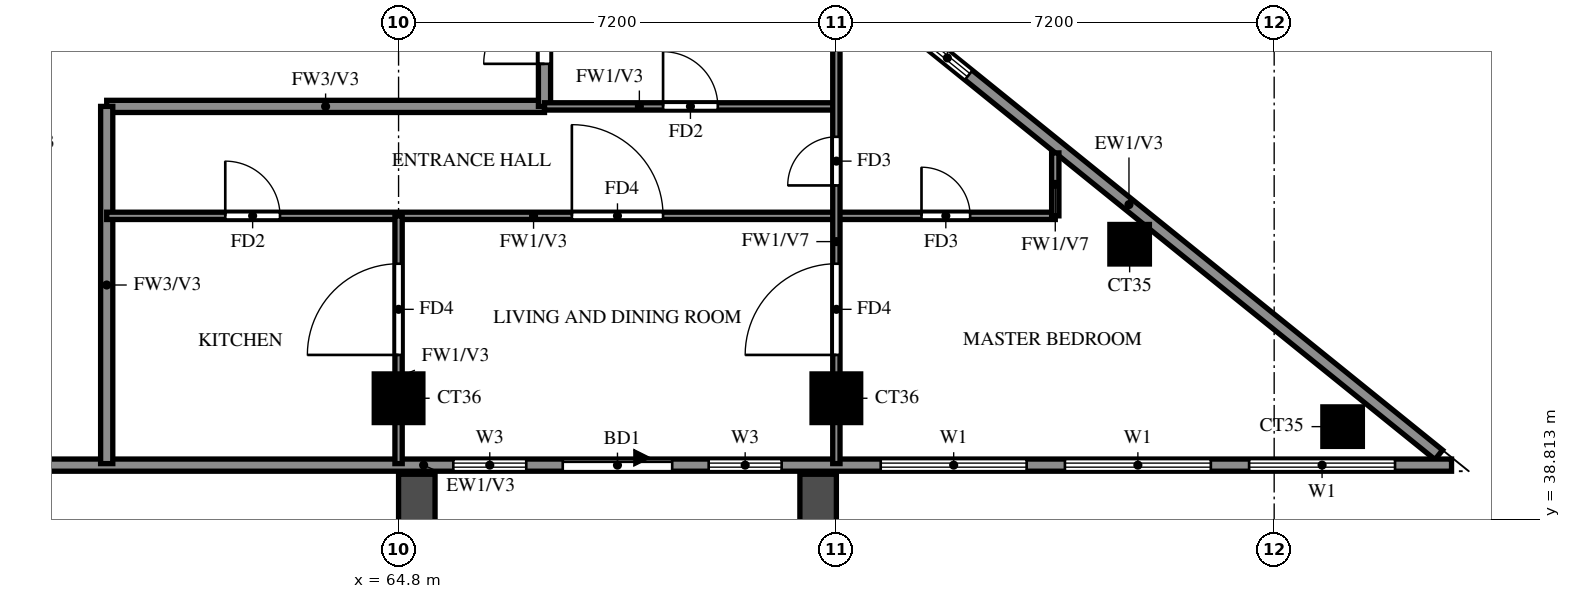
"""IFC4 building model, lengths in metres.
Left out: names, types, materials, properties, quantities, classifications, styles, units other than length and angle.
Written with IfcOpenShell. Run it as: python <this file> out.ifc"""

import sys

from ifc_helpers import new_model, si_unit, direction, frame, frame_2d, origin, origin_2d, place, context, subcontext, project, spatial, rectangle, extrude, source, transform, mapped, element, fill, save


model = new_model("IFC4")
c1 = context("Model", 3, precision=1e-05, world=origin(), true_north=direction((0.0, 1.0)))
c2 = subcontext(c1, "Body", "Model", "MODEL_VIEW")
j1 = project(units=[si_unit("LENGTHUNIT", "METRE"), si_unit("PLANEANGLEUNIT", "RADIAN")], contexts=[c1])
p1 = place(None, origin())
s1 = spatial("IfcSite", under=j1, at=p1, CompositionType="ELEMENT")
p2 = place(p1, origin())
s2 = spatial("IfcBuilding", under=s1, at=p2, CompositionType="ELEMENT")
p3 = place(p2, frame((0.0, 0.0, 232.5)))
s3 = spatial("IfcBuildingStorey", under=s2, at=p3, CompositionType="ELEMENT", Elevation=232.5)
m1 = source(origin(), c2, "Body", "SweptSolid", [
    extrude(rectangle(XDim=0.65, YDim=0.65, at=origin_2d()), origin(), (0.0, 0.0, 1.0), 3.22),
])
p4 = place(p3, frame((80.326, 40.333, 0.0), z_axis=(0.0, 0.0, 1.0), x_axis=(1.0, 0.0, 0.0)))
e1 = element("IfcColumn", 1, at=p4, inside=s3, PredefinedType="COLUMN", context=c2, shape_type="MappedRepresentation", body=[
    mapped(m1, transform((0.0, 0.0, 0.0))),
])
m2 = source(origin(), c2, "Body", "SweptSolid", [
    extrude(rectangle(XDim=0.8, YDim=0.8, at=origin_2d()), origin(), (0.0, 0.0, 1.0), 3.22),
])
for number, where, z_axis, x_axis in (
    (2, (64.8, 40.8, 0.0), (0.0, 0.0, 1.0), (1.0, 0.0, 0.0)),
    (3, (72.0, 40.8, 0.0), (0.0, 0.0, 1.0), (1.0, 0.0, 0.0)),
):
    element("IfcColumn", number, at=place(p3, frame(where, z_axis=z_axis, x_axis=x_axis)), inside=s3, PredefinedType="COLUMN", context=c2, shape_type="MappedRepresentation", body=[
        mapped(m2, transform((0.0, 0.0, 0.0))),
    ])
p5 = place(p3, frame((76.823, 43.333, 0.0), z_axis=(0.0, 0.0, 1.0), x_axis=(1.0, 0.0, 0.0)))
e4 = element("IfcColumn", 4, at=p5, inside=s3, PredefinedType="COLUMN", context=c2, shape_type="MappedRepresentation", body=[
    mapped(m1, transform((0.0, 0.0, 0.0))),
])
p6 = place(p3, frame((81.907, 39.87, 0.0), z_axis=(0.0, 0.0, 1.0), x_axis=(-0.777936274417, 0.62834318087, 0.0)))
e5 = element("IfcWall", 5, at=p6, inside=s3, PredefinedType="SOLIDWALL", context=c2, shape_type="SweptSolid", body=[
    extrude(rectangle(XDim=13.099, YDim=0.2, at=frame_2d((6.549, 0.0))), origin(), (0.0, 0.0, 1.0), 3.22),
])
p7 = place(p6, frame((9.938, 0.0, 1.5)))
e6 = element("IfcOpeningElement", 6, at=p7, cuts=e5, PredefinedType="OPENING", context=c2, shape_type="SweptSolid", body=[
    extrude(rectangle(XDim=0.9, YDim=0.9, at=frame_2d((0.45, 0.45))), frame((0.0, 0.11, 0.0), z_axis=(0.0, -1.0, 0.0), x_axis=(1.0, 0.0, 0.0)), (0.0, 0.0, 1.0), 0.22),
])
p8 = place(p3, frame((58.8, 39.7, 0.0), z_axis=(0.0, 0.0, 1.0), x_axis=(1.0, 0.0, 0.0)))
e7 = element("IfcWall", 7, at=p8, inside=s3, PredefinedType="SOLIDWALL", context=c2, shape_type="SweptSolid", body=[
    extrude(rectangle(XDim=23.317, YDim=0.2, at=frame_2d((11.658, 0.0))), origin(), (0.0, 0.0, 1.0), 3.22),
])
p9 = place(p8, frame((8.7, 0.0, 0.0)))
e8 = element("IfcOpeningElement", 8, at=p9, cuts=e7, PredefinedType="OPENING", context=c2, shape_type="SweptSolid", body=[
    extrude(rectangle(XDim=1.8, YDim=2.4, at=frame_2d((0.9, 1.2))), frame((0.0, 0.11, 0.0), z_axis=(0.0, -1.0, 0.0), x_axis=(1.0, 0.0, 0.0)), (0.0, 0.0, 1.0), 0.22),
])
p10 = place(p8, frame((6.9, 0.0, 0.6)))
e9 = element("IfcOpeningElement", 9, at=p10, cuts=e7, PredefinedType="OPENING", context=c2, shape_type="SweptSolid", body=[
    extrude(rectangle(XDim=1.2, YDim=2.4, at=frame_2d((0.6, 1.2))), frame((0.0, 0.11, 0.0), z_axis=(0.0, -1.0, 0.0), x_axis=(1.0, 0.0, 0.0)), (0.0, 0.0, 1.0), 0.22),
])
p11 = place(p8, frame((11.1, 0.0, 0.6)))
e10 = element("IfcOpeningElement", 10, at=p11, cuts=e7, PredefinedType="OPENING", context=c2, shape_type="SweptSolid", body=[
    extrude(rectangle(XDim=1.2, YDim=2.4, at=frame_2d((0.6, 1.2))), frame((0.0, 0.11, 0.0), z_axis=(0.0, -1.0, 0.0), x_axis=(1.0, 0.0, 0.0)), (0.0, 0.0, 1.0), 0.22),
])
p12 = place(p8, frame((13.929, 0.0, 0.6)))
e11 = element("IfcOpeningElement", 11, at=p12, cuts=e7, PredefinedType="OPENING", context=c2, shape_type="SweptSolid", body=[
    extrude(rectangle(XDim=2.4, YDim=2.4, at=frame_2d((1.2, 1.2))), frame((0.0, 0.11, 0.0), z_axis=(0.0, -1.0, 0.0), x_axis=(1.0, 0.0, 0.0)), (0.0, 0.0, 1.0), 0.22),
])
p13 = place(p8, frame((16.958, 0.0, 0.6)))
e12 = element("IfcOpeningElement", 12, at=p13, cuts=e7, PredefinedType="OPENING", context=c2, shape_type="SweptSolid", body=[
    extrude(rectangle(XDim=2.4, YDim=2.4, at=frame_2d((1.2, 1.2))), frame((0.0, 0.11, 0.0), z_axis=(0.0, -1.0, 0.0), x_axis=(1.0, 0.0, 0.0)), (0.0, 0.0, 1.0), 0.22),
])
p14 = place(p8, frame((19.988, 0.0, 0.6)))
e13 = element("IfcOpeningElement", 13, at=p14, cuts=e7, PredefinedType="OPENING", context=c2, shape_type="SweptSolid", body=[
    extrude(rectangle(XDim=2.4, YDim=2.4, at=frame_2d((1.2, 1.2))), frame((0.0, 0.11, 0.0), z_axis=(0.0, -1.0, 0.0), x_axis=(1.0, 0.0, 0.0)), (0.0, 0.0, 1.0), 0.22),
])
for number, where, z_axis, x_axis in (
    (14, (65.1, 39.55, 0.0), (0.0, 0.0, 1.0), (0.0, -1.0, 0.0)),
    (15, (71.7, 39.55, 0.0), (0.0, 0.0, 1.0), (0.0, -1.0, 0.0)),
):
    element("IfcWall", number, at=place(p3, frame(where, z_axis=z_axis, x_axis=x_axis)), inside=s3, PredefinedType="SOLIDWALL", context=c2, shape_type="SweptSolid", body=[
        extrude(rectangle(XDim=2.65, YDim=0.6, at=frame_2d((1.325, 0.0))), origin(), (0.0, 0.0, 1.0), 2.85),
    ])
p15 = place(p3, frame((60.0, 45.6, 0.0), z_axis=(0.0, 0.0, 1.0), x_axis=(1.0, 0.0, 0.0)))
e16 = element("IfcWall", 16, at=p15, inside=s3, PredefinedType="SOLIDWALL", context=c2, shape_type="SweptSolid", body=[
    extrude(rectangle(XDim=7.2, YDim=0.2, at=frame_2d((3.6, 0.0))), origin(), (0.0, 0.0, 1.0), 3.22),
])
p16 = place(p3, frame((60.0, 39.725, 0.0), z_axis=(0.0, 0.0, 1.0), x_axis=(0.0, 1.0, 0.0)))
e17 = element("IfcWall", 17, at=p16, inside=s3, PredefinedType="SOLIDWALL", context=c2, shape_type="SweptSolid", body=[
    extrude(rectangle(XDim=5.875, YDim=0.2, at=frame_2d((2.938, 0.0))), origin(), (0.0, 0.0, 1.0), 3.22),
])
p17 = place(p3, frame((67.2, 45.6, 0.0), z_axis=(0.0, 0.0, 1.0), x_axis=(0.0, 1.0, 0.0)))
e18 = element("IfcWall", 18, at=p17, inside=s3, PredefinedType="SOLIDWALL", context=c2, shape_type="SweptSolid", body=[
    extrude(rectangle(XDim=16.8, YDim=0.2, at=frame_2d((8.4, 0.0))), origin(), (0.0, 0.0, 1.0), 3.22),
])
p18 = place(p17, frame((6.7, 0.0, 0.0)))
e19 = element("IfcOpeningElement", 19, at=p18, cuts=e18, PredefinedType="OPENING", context=c2, shape_type="SweptSolid", body=[
    extrude(rectangle(XDim=1.0, YDim=2.1, at=frame_2d((0.5, 1.05))), frame((0.0, 0.11, 0.0), z_axis=(0.0, -1.0, 0.0), x_axis=(1.0, 0.0, 0.0)), (0.0, 0.0, 1.0), 0.22),
])
p19 = place(p17, frame((15.1, 0.0, 0.0)))
e20 = element("IfcOpeningElement", 20, at=p19, cuts=e18, PredefinedType="OPENING", context=c2, shape_type="SweptSolid", body=[
    extrude(rectangle(XDim=1.0, YDim=2.1, at=frame_2d((0.5, 1.05))), frame((0.0, 0.11, 0.0), z_axis=(0.0, -1.0, 0.0), x_axis=(1.0, 0.0, 0.0)), (0.0, 0.0, 1.0), 0.22),
])
p20 = place(p17, frame((0.7, 0.0, 0.0)))
e21 = element("IfcOpeningElement", 21, at=p20, cuts=e18, PredefinedType="OPENING", context=c2, shape_type="SweptSolid", body=[
    extrude(rectangle(XDim=1.0, YDim=2.1, at=frame_2d((0.5, 1.05))), frame((0.0, 0.11, 0.0), z_axis=(0.0, -1.0, 0.0), x_axis=(1.0, 0.0, 0.0)), (0.0, 0.0, 1.0), 0.22),
])
p21 = place(p3, frame((60.0, 43.8, 0.0), z_axis=(0.0, 0.0, 1.0), x_axis=(1.0, 0.0, 0.0)))
e22 = element("IfcWall", 22, at=p21, inside=s3, PredefinedType="PARTITIONING", context=c2, shape_type="SweptSolid", body=[
    extrude(rectangle(XDim=15.6, YDim=0.12, at=frame_2d((7.8, 0.0))), origin(), (0.0, 0.0, 1.0), 3.22),
])
p22 = place(p21, frame((7.65, 0.0, 0.0)))
e23 = element("IfcOpeningElement", 23, at=p22, cuts=e22, PredefinedType="OPENING", context=c2, shape_type="SweptSolid", body=[
    extrude(rectangle(XDim=1.5, YDim=2.1, at=frame_2d((0.75, 1.05))), frame((0.0, 0.07, 0.0), z_axis=(0.0, -1.0, 0.0), x_axis=(1.0, 0.0, 0.0)), (0.0, 0.0, 1.0), 0.14),
])
p23 = place(p21, frame((1.95, 0.0, 0.0)))
e24 = element("IfcOpeningElement", 24, at=p23, cuts=e22, PredefinedType="OPENING", context=c2, shape_type="SweptSolid", body=[
    extrude(rectangle(XDim=0.9, YDim=2.1, at=frame_2d((0.45, 1.05))), frame((0.0, 0.07, 0.0), z_axis=(0.0, -1.0, 0.0), x_axis=(1.0, 0.0, 0.0)), (0.0, 0.0, 1.0), 0.14),
])
p24 = place(p21, frame((13.4, 0.0, 0.0)))
e25 = element("IfcOpeningElement", 25, at=p24, cuts=e22, PredefinedType="OPENING", context=c2, shape_type="SweptSolid", body=[
    extrude(rectangle(XDim=0.8, YDim=2.1, at=frame_2d((0.4, 1.05))), frame((0.0, 0.07, 0.0), z_axis=(0.0, -1.0, 0.0), x_axis=(1.0, 0.0, 0.0)), (0.0, 0.0, 1.0), 0.14),
])
p25 = place(p3, frame((67.2, 45.6, 0.0), z_axis=(0.0, 0.0, 1.0), x_axis=(1.0, 0.0, 0.0)))
e26 = element("IfcWall", 26, at=p25, inside=s3, PredefinedType="PARTITIONING", context=c2, shape_type="SweptSolid", body=[
    extrude(rectangle(XDim=4.8, YDim=0.12, at=frame_2d((2.4, 0.0))), origin(), (0.0, 0.0, 1.0), 3.22),
])
p26 = place(p25, frame((1.95, 0.0, 0.0)))
e27 = element("IfcOpeningElement", 27, at=p26, cuts=e26, PredefinedType="OPENING", context=c2, shape_type="SweptSolid", body=[
    extrude(rectangle(XDim=0.9, YDim=2.1, at=frame_2d((0.45, 1.05))), frame((0.0, 0.07, 0.0), z_axis=(0.0, -1.0, 0.0), x_axis=(1.0, 0.0, 0.0)), (0.0, 0.0, 1.0), 0.14),
])
p27 = place(p3, frame((64.8, 39.725, 0.0), z_axis=(0.0, 0.0, 1.0), x_axis=(0.0, 1.0, 0.0)))
e28 = element("IfcWall", 28, at=p27, inside=s3, PredefinedType="PARTITIONING", context=c2, shape_type="SweptSolid", body=[
    extrude(rectangle(XDim=4.075, YDim=0.12, at=frame_2d((2.038, 0.0))), origin(), (0.0, 0.0, 1.0), 3.22),
])
p28 = place(p27, frame((1.788, 0.0, 0.0)))
e29 = element("IfcOpeningElement", 29, at=p28, cuts=e28, PredefinedType="OPENING", context=c2, shape_type="SweptSolid", body=[
    extrude(rectangle(XDim=1.5, YDim=2.1, at=frame_2d((0.75, 1.05))), frame((0.0, 0.07, 0.0), z_axis=(0.0, -1.0, 0.0), x_axis=(1.0, 0.0, 0.0)), (0.0, 0.0, 1.0), 0.14),
])
p29 = place(p3, frame((72.0, 39.725, 0.0), z_axis=(0.0, 0.0, 1.0), x_axis=(0.0, 1.0, 0.0)))
e30 = element("IfcWall", 30, at=p29, inside=s3, PredefinedType="PARTITIONING", context=c2, shape_type="SweptSolid", body=[
    extrude(rectangle(XDim=8.114, YDim=0.12, at=frame_2d((4.057, 0.0))), origin(), (0.0, 0.0, 1.0), 2.32),
])
p30 = place(p29, frame((1.788, 0.0, 0.0)))
e31 = element("IfcOpeningElement", 31, at=p30, cuts=e30, PredefinedType="OPENING", context=c2, shape_type="SweptSolid", body=[
    extrude(rectangle(XDim=1.5, YDim=2.1, at=frame_2d((0.75, 1.05))), frame((0.0, 0.07, 0.0), z_axis=(0.0, -1.0, 0.0), x_axis=(1.0, 0.0, 0.0)), (0.0, 0.0, 1.0), 0.14),
])
p31 = place(p29, frame((4.575, 0.0, 0.0)))
e32 = element("IfcOpeningElement", 32, at=p31, cuts=e30, PredefinedType="OPENING", context=c2, shape_type="SweptSolid", body=[
    extrude(rectangle(XDim=0.8, YDim=2.1, at=frame_2d((0.4, 1.05))), frame((0.0, 0.07, 0.0), z_axis=(0.0, -1.0, 0.0), x_axis=(1.0, 0.0, 0.0)), (0.0, 0.0, 1.0), 0.14),
])
p32 = place(p3, frame((75.6, 43.8, 0.0), z_axis=(0.0, 0.0, 1.0), x_axis=(0.0, 1.0, 0.0)))
e33 = element("IfcWall", 33, at=p32, inside=s3, PredefinedType="PARTITIONING", context=c2, shape_type="SweptSolid", body=[
    extrude(rectangle(XDim=1.035, YDim=0.12, at=frame_2d((0.518, 0.0))), origin(), (0.0, 0.0, 1.0), 2.32),
])
p33 = place(p7, origin())
e34 = element("IfcWindow", 34, at=p33, inside=s3, PartitioningType="SINGLE_PANEL", PredefinedType="WINDOW", context=c2, shape_type="SweptSolid", body=[
    extrude(rectangle(XDim=0.9, YDim=0.9, at=frame_2d((0.45, 0.45))), frame((0.0, 0.03, 0.0), z_axis=(0.0, -1.0, 0.0), x_axis=(1.0, 0.0, 0.0)), (0.0, 0.0, 1.0), 0.06),
])
fill(e6, e34)
p34 = place(p9, origin())
e35 = element("IfcDoor", 35, at=p34, inside=s3, OperationType="DOUBLE_DOOR_SLIDING", PredefinedType="DOOR", context=c2, shape_type="SweptSolid", body=[
    extrude(rectangle(XDim=1.8, YDim=2.4, at=frame_2d((0.9, 1.2))), frame((0.0, 0.025, 0.0), z_axis=(0.0, -1.0, 0.0), x_axis=(1.0, 0.0, 0.0)), (0.0, 0.0, 1.0), 0.05),
])
fill(e8, e35)
p35 = place(p10, origin())
e36 = element("IfcWindow", 36, at=p35, inside=s3, PartitioningType="SINGLE_PANEL", PredefinedType="WINDOW", context=c2, shape_type="SweptSolid", body=[
    extrude(rectangle(XDim=1.2, YDim=2.4, at=frame_2d((0.6, 1.2))), frame((0.0, 0.03, 0.0), z_axis=(0.0, -1.0, 0.0), x_axis=(1.0, 0.0, 0.0)), (0.0, 0.0, 1.0), 0.06),
])
fill(e9, e36)
p36 = place(p11, origin())
e37 = element("IfcWindow", 37, at=p36, inside=s3, PartitioningType="SINGLE_PANEL", PredefinedType="WINDOW", context=c2, shape_type="SweptSolid", body=[
    extrude(rectangle(XDim=1.2, YDim=2.4, at=frame_2d((0.6, 1.2))), frame((0.0, 0.03, 0.0), z_axis=(0.0, -1.0, 0.0), x_axis=(1.0, 0.0, 0.0)), (0.0, 0.0, 1.0), 0.06),
])
fill(e10, e37)
p37 = place(p12, origin())
e38 = element("IfcWindow", 38, at=p37, inside=s3, PartitioningType="DOUBLE_PANEL_VERTICAL", PredefinedType="WINDOW", context=c2, shape_type="SweptSolid", body=[
    extrude(rectangle(XDim=2.4, YDim=2.4, at=frame_2d((1.2, 1.2))), frame((0.0, 0.03, 0.0), z_axis=(0.0, -1.0, 0.0), x_axis=(1.0, 0.0, 0.0)), (0.0, 0.0, 1.0), 0.06),
])
fill(e11, e38)
p38 = place(p13, origin())
e39 = element("IfcWindow", 39, at=p38, inside=s3, PartitioningType="DOUBLE_PANEL_VERTICAL", PredefinedType="WINDOW", context=c2, shape_type="SweptSolid", body=[
    extrude(rectangle(XDim=2.4, YDim=2.4, at=frame_2d((1.2, 1.2))), frame((0.0, 0.03, 0.0), z_axis=(0.0, -1.0, 0.0), x_axis=(1.0, 0.0, 0.0)), (0.0, 0.0, 1.0), 0.06),
])
fill(e12, e39)
p39 = place(p14, origin())
e40 = element("IfcWindow", 40, at=p39, inside=s3, PartitioningType="DOUBLE_PANEL_VERTICAL", PredefinedType="WINDOW", context=c2, shape_type="SweptSolid", body=[
    extrude(rectangle(XDim=2.4, YDim=2.4, at=frame_2d((1.2, 1.2))), frame((0.0, 0.03, 0.0), z_axis=(0.0, -1.0, 0.0), x_axis=(1.0, 0.0, 0.0)), (0.0, 0.0, 1.0), 0.06),
])
fill(e13, e40)
p40 = place(p28, origin())
e41 = element("IfcDoor", 41, at=p40, inside=s3, OperationType="SINGLE_SWING_LEFT", PredefinedType="DOOR", context=c2, shape_type="SweptSolid", body=[
    extrude(rectangle(XDim=1.5, YDim=2.1, at=frame_2d((0.75, 1.05))), frame((0.0, 0.025, 0.0), z_axis=(0.0, -1.0, 0.0), x_axis=(1.0, 0.0, 0.0)), (0.0, 0.0, 1.0), 0.05),
])
fill(e29, e41)
p41 = place(p26, origin())
e42 = element("IfcDoor", 42, at=p41, inside=s3, OperationType="SINGLE_SWING_LEFT", PredefinedType="DOOR", context=c2, shape_type="SweptSolid", body=[
    extrude(rectangle(XDim=0.9, YDim=2.1, at=frame_2d((0.45, 1.05))), frame((0.0, 0.025, 0.0), z_axis=(0.0, -1.0, 0.0), x_axis=(1.0, 0.0, 0.0)), (0.0, 0.0, 1.0), 0.05),
])
fill(e27, e42)
p42 = place(p20, origin())
e43 = element("IfcDoor", 43, at=p42, inside=s3, OperationType="SINGLE_SWING_LEFT", PredefinedType="DOOR", context=c2, shape_type="SweptSolid", body=[
    extrude(rectangle(XDim=1.0, YDim=2.1, at=frame_2d((0.5, 1.05))), frame((0.0, 0.025, 0.0), z_axis=(0.0, -1.0, 0.0), x_axis=(1.0, 0.0, 0.0)), (0.0, 0.0, 1.0), 0.05),
])
fill(e21, e43)
p43 = place(p22, origin())
e44 = element("IfcDoor", 44, at=p43, inside=s3, OperationType="SINGLE_SWING_RIGHT", PredefinedType="DOOR", context=c2, shape_type="SweptSolid", body=[
    extrude(rectangle(XDim=1.5, YDim=2.1, at=frame_2d((0.75, 1.05))), frame((0.0, 0.025, 0.0), z_axis=(0.0, -1.0, 0.0), x_axis=(1.0, 0.0, 0.0)), (0.0, 0.0, 1.0), 0.05),
])
fill(e23, e44)
p44 = place(p23, origin())
e45 = element("IfcDoor", 45, at=p44, inside=s3, OperationType="SINGLE_SWING_LEFT", PredefinedType="DOOR", context=c2, shape_type="SweptSolid", body=[
    extrude(rectangle(XDim=0.9, YDim=2.1, at=frame_2d((0.45, 1.05))), frame((0.0, 0.025, 0.0), z_axis=(0.0, -1.0, 0.0), x_axis=(1.0, 0.0, 0.0)), (0.0, 0.0, 1.0), 0.05),
])
fill(e24, e45)
p45 = place(p30, origin())
e46 = element("IfcDoor", 46, at=p45, inside=s3, OperationType="SINGLE_SWING_RIGHT", PredefinedType="DOOR", context=c2, shape_type="SweptSolid", body=[
    extrude(rectangle(XDim=1.5, YDim=2.1, at=frame_2d((0.75, 1.05))), frame((0.0, 0.025, 0.0), z_axis=(0.0, -1.0, 0.0), x_axis=(1.0, 0.0, 0.0)), (0.0, 0.0, 1.0), 0.05),
])
fill(e31, e46)
p46 = place(p31, origin())
e47 = element("IfcDoor", 47, at=p46, inside=s3, OperationType="SINGLE_SWING_RIGHT", PredefinedType="DOOR", context=c2, shape_type="SweptSolid", body=[
    extrude(rectangle(XDim=0.8, YDim=2.1, at=frame_2d((0.4, 1.05))), frame((0.0, 0.025, 0.0), z_axis=(0.0, -1.0, 0.0), x_axis=(1.0, 0.0, 0.0)), (0.0, 0.0, 1.0), 0.05),
])
fill(e32, e47)
p47 = place(p24, origin())
e48 = element("IfcDoor", 48, at=p47, inside=s3, OperationType="SINGLE_SWING_LEFT", PredefinedType="DOOR", context=c2, shape_type="SweptSolid", body=[
    extrude(rectangle(XDim=0.8, YDim=2.1, at=frame_2d((0.4, 1.05))), frame((0.0, 0.025, 0.0), z_axis=(0.0, -1.0, 0.0), x_axis=(1.0, 0.0, 0.0)), (0.0, 0.0, 1.0), 0.05),
])
fill(e25, e48)
save(model, sys.argv[1])
